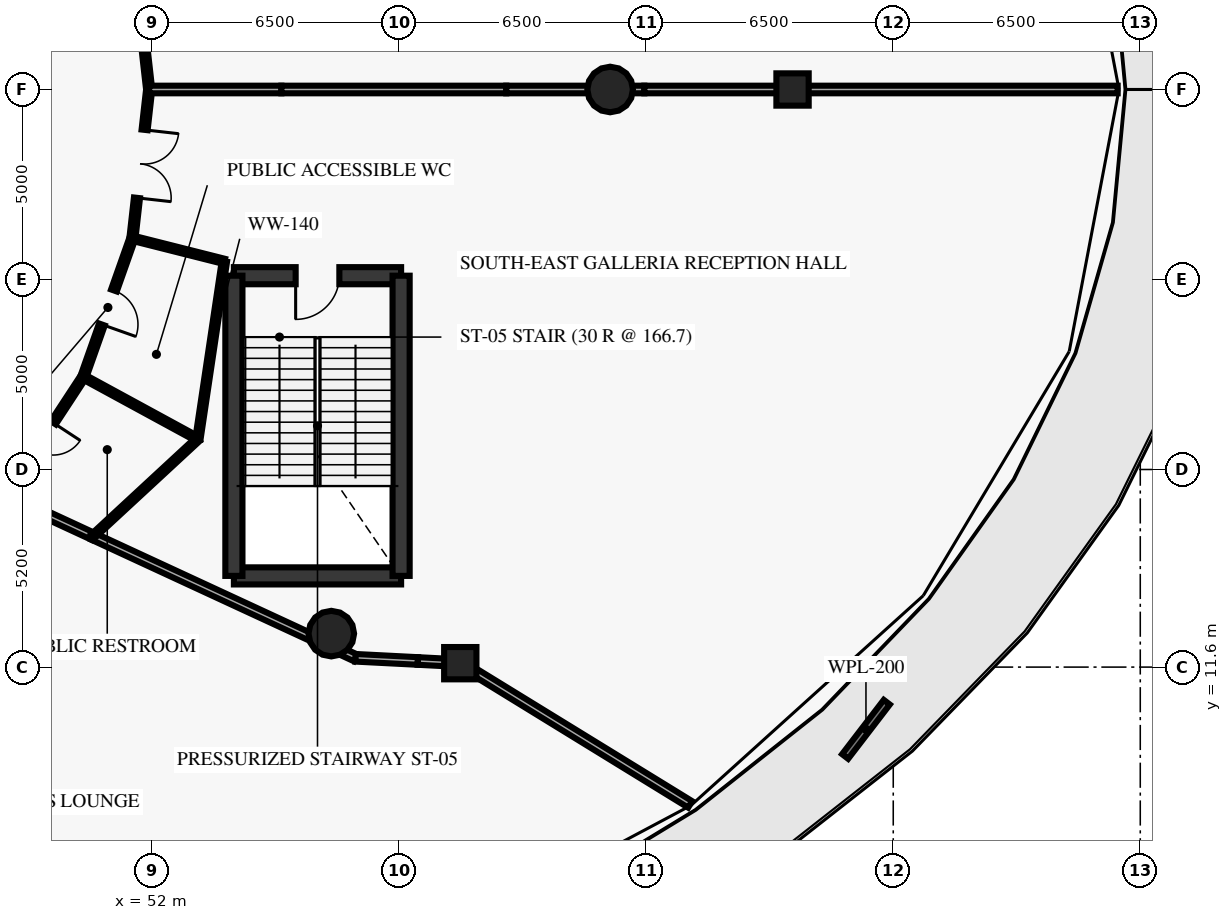
"""IFC4 building model, lengths in metres.
Left out: names, types, materials, properties, quantities, classifications, styles, units other than length and angle.
Written with IfcOpenShell. Run it as: python <this file> out.ifc"""

import sys

from ifc_helpers import new_model, si_unit, direction, frame, frame_2d, origin, origin_2d, place, context, subcontext, project, spatial, rectangle, circle, extrude, element, fill, save


model = new_model("IFC4")
c1 = context("Model", 3, precision=1e-05, world=origin(), true_north=direction((0.0, 1.0)))
c2 = subcontext(c1, "Body", "Model", "MODEL_VIEW")
j1 = project(units=[si_unit("LENGTHUNIT", "METRE"), si_unit("PLANEANGLEUNIT", "RADIAN")], contexts=[c1])
p1 = place(None, origin())
s1 = spatial("IfcSite", under=j1, at=p1, CompositionType="ELEMENT")
p2 = place(p1, origin())
s2 = spatial("IfcBuilding", under=s1, at=p2, CompositionType="ELEMENT")
p3 = place(p2, frame((0.0, 0.0, 6.0)))
s3 = spatial("IfcBuildingStorey", under=s2, at=p3, CompositionType="ELEMENT", Elevation=6.0)
for number, where, z_axis, x_axis in (
    (1, (64.05, 26.8, 0.0), (0.0, 0.0, 1.0), (1.0, 0.0, 0.0)),
    (2, (56.713, 12.481, 0.0), (0.0, 0.0, 1.0), (1.0, 0.0, 0.0)),
):
    element("IfcColumn", number, at=place(p3, frame(where, z_axis=z_axis, x_axis=x_axis)), inside=s3, PredefinedType="COLUMN", context=c2, shape_type="SweptSolid", body=[
        extrude(circle(Radius=0.6, at=origin_2d()), origin(), (0.0, 0.0, 1.0), 4.7),
    ])
for number, where, z_axis, x_axis in (
    (3, (68.85, 26.8, 0.0), (0.0, 0.0, 1.0), (1.0, 0.0, 0.0)),
    (4, (60.107, 11.703, 0.0), (0.0, 0.0, 1.0), (1.0, 0.0, 0.0)),
):
    element("IfcColumn", number, at=place(p3, frame(where, z_axis=z_axis, x_axis=x_axis)), inside=s3, PredefinedType="COLUMN", context=c2, shape_type="SweptSolid", body=[
        extrude(rectangle(XDim=0.85, YDim=0.85, at=origin_2d()), origin(), (0.0, 0.0, 1.0), 4.7),
    ])
p4 = place(p3, frame((71.33, 10.676, 0.0), z_axis=(0.0, 0.0, 1.0), x_axis=(-0.608923978219, -0.793228585434, 0.0)))
e5 = element("IfcWall", 5, at=p4, inside=s3, PredefinedType="ELEMENTEDWALL", context=c2, shape_type="SweptSolid", body=[
    extrude(rectangle(XDim=1.8, YDim=0.2, at=frame_2d((0.9, 0.0))), origin(), (0.0, 0.0, 1.0), 0.65),
])
p5 = place(p3, frame((54.15, 14.0, 0.0), z_axis=(0.0, 0.0, 1.0), x_axis=(1.0, 0.0, 0.0)))
e6 = element("IfcWall", 6, at=p5, inside=s3, PredefinedType="SHEAR", context=c2, shape_type="SweptSolid", body=[
    extrude(rectangle(XDim=4.4, YDim=0.45, at=frame_2d((2.2, 0.0))), origin(), (0.0, 0.0, 1.0), 4.7),
])
p6 = place(p3, frame((58.55, 21.9, 0.0), z_axis=(0.0, 0.0, 1.0), x_axis=(-1.0, 0.0, 0.0)))
e7 = element("IfcWall", 7, at=p6, inside=s3, PredefinedType="SHEAR", context=c2, shape_type="SweptSolid", body=[
    extrude(rectangle(XDim=4.4, YDim=0.45, at=frame_2d((2.2, 0.0))), origin(), (0.0, 0.0, 1.0), 4.7),
])
p7 = place(p6, frame((1.625, 0.0, 0.0)))
e8 = element("IfcOpeningElement", 8, at=p7, cuts=e7, PredefinedType="OPENING", context=c2, shape_type="SweptSolid", body=[
    extrude(rectangle(XDim=1.15, YDim=2.15, at=frame_2d((0.575, 1.075))), frame((0.0, 0.235, 0.0), z_axis=(0.0, -1.0, 0.0), x_axis=(1.0, 0.0, 0.0)), (0.0, 0.0, 1.0), 0.47),
])
for number, where, z_axis, x_axis in (
    (9, (54.15, 14.0, 0.0), (0.0, 0.0, 1.0), (0.0, 1.0, 0.0)),
    (10, (58.55, 14.0, 0.0), (0.0, 0.0, 1.0), (0.0, 1.0, 0.0)),
):
    element("IfcWall", number, at=place(p3, frame(where, z_axis=z_axis, x_axis=x_axis)), inside=s3, PredefinedType="SHEAR", context=c2, shape_type="SweptSolid", body=[
        extrude(rectangle(XDim=7.9, YDim=0.45, at=frame_2d((3.95, 0.0))), origin(), (0.0, 0.0, 1.0), 4.7),
    ])
p8 = place(p3, frame((51.92, 26.8, 0.0), z_axis=(0.0, 0.0, 1.0), x_axis=(-0.111731247657, 0.993738460711, 0.0)))
e11 = element("IfcWall", 11, at=p8, inside=s3, PredefinedType="PARTITIONING", context=c2, shape_type="SweptSolid", body=[
    extrude(rectangle(XDim=3.938, YDim=0.16, at=frame_2d((1.969, 0.0))), origin(), (0.0, 0.0, 1.0), 4.7),
])
p9 = place(p3, frame((50.189, 19.24, 0.0), z_axis=(0.0, 0.0, 1.0), x_axis=(-0.548318837904, -0.836269365694, 0.0)))
e12 = element("IfcWall", 12, at=p9, inside=s3, PredefinedType="PARTITIONING", context=c2, shape_type="SweptSolid", body=[
    extrude(rectangle(XDim=3.744, YDim=0.16, at=frame_2d((1.872, 0.0))), origin(), (0.0, 0.0, 1.0), 4.7),
])
p10 = place(p9, frame((1.447, 0.0, 0.0)))
e13 = element("IfcOpeningElement", 13, at=p10, cuts=e12, PredefinedType="OPENING", context=c2, shape_type="SweptSolid", body=[
    extrude(rectangle(XDim=0.85, YDim=2.1, at=frame_2d((0.425, 1.05))), frame((0.0, 0.09, 0.0), z_axis=(0.0, -1.0, 0.0), x_axis=(1.0, 0.0, 0.0)), (0.0, 0.0, 1.0), 0.18),
])
p11 = place(p3, frame((51.48, 22.887, 0.0), z_axis=(0.0, 0.0, 1.0), x_axis=(-0.333704620558, -0.942677689467, 0.0)))
e14 = element("IfcWall", 14, at=p11, inside=s3, PredefinedType="PARTITIONING", context=c2, shape_type="SweptSolid", body=[
    extrude(rectangle(XDim=3.869, YDim=0.16, at=frame_2d((1.934, 0.0))), origin(), (0.0, 0.0, 1.0), 4.7),
])
p12 = place(p11, frame((1.459, 0.0, 0.0)))
e15 = element("IfcOpeningElement", 15, at=p12, cuts=e14, PredefinedType="OPENING", context=c2, shape_type="SweptSolid", body=[
    extrude(rectangle(XDim=0.95, YDim=2.1, at=frame_2d((0.475, 1.05))), frame((0.0, 0.09, 0.0), z_axis=(0.0, -1.0, 0.0), x_axis=(1.0, 0.0, 0.0)), (0.0, 0.0, 1.0), 0.18),
])
p13 = place(p3, frame((51.92, 26.8, 0.0), z_axis=(0.0, 0.0, 1.0), x_axis=(-0.111724363671, -0.99373923469, 0.0)))
e16 = element("IfcWall", 16, at=p13, inside=s3, PredefinedType="PARTITIONING", context=c2, shape_type="SweptSolid", body=[
    extrude(rectangle(XDim=3.938, YDim=0.16, at=frame_2d((1.969, 0.0))), origin(), (0.0, 0.0, 1.0), 4.7),
])
p14 = place(p13, frame((1.069, 0.0, 0.0)))
e17 = element("IfcOpeningElement", 17, at=p14, cuts=e16, PredefinedType="OPENING", context=c2, shape_type="SweptSolid", body=[
    extrude(rectangle(XDim=1.8, YDim=2.3, at=frame_2d((0.9, 1.15))), frame((0.0, 0.09, 0.0), z_axis=(0.0, -1.0, 0.0), x_axis=(1.0, 0.0, 0.0)), (0.0, 0.0, 1.0), 0.18),
])
p15 = place(p3, frame((51.92, 26.8, 0.0), z_axis=(0.0, 0.0, 1.0), x_axis=(1.0, 0.0, 0.0)))
e18 = element("IfcWall", 18, at=p15, inside=s3, PredefinedType="PARTITIONING", context=c2, shape_type="SweptSolid", body=[
    extrude(rectangle(XDim=3.48, YDim=0.2, at=frame_2d((1.74, 0.0))), origin(), (0.0, 0.0, 1.0), 4.7),
])
p16 = place(p3, frame((55.4, 26.8, 0.0), z_axis=(0.0, 0.0, 1.0), x_axis=(1.0, 0.0, 0.0)))
e19 = element("IfcWall", 19, at=p16, inside=s3, PredefinedType="PARTITIONING", context=c2, shape_type="SweptSolid", body=[
    extrude(rectangle(XDim=5.917, YDim=0.2, at=frame_2d((2.958, 0.0))), origin(), (0.0, 0.0, 1.0), 4.7),
])
p17 = place(p3, frame((61.317, 26.8, 0.0), z_axis=(0.0, 0.0, 1.0), x_axis=(1.0, 0.0, 0.0)))
e20 = element("IfcWall", 20, at=p17, inside=s3, PredefinedType="PARTITIONING", context=c2, shape_type="SweptSolid", body=[
    extrude(rectangle(XDim=3.633, YDim=0.2, at=frame_2d((1.816, 0.0))), origin(), (0.0, 0.0, 1.0), 3.66),
])
p18 = place(p3, frame((64.95, 26.8, 0.0), z_axis=(0.0, 0.0, 1.0), x_axis=(1.0, 0.0, 0.0)))
e21 = element("IfcWall", 21, at=p18, inside=s3, PredefinedType="PARTITIONING", context=c2, shape_type="SweptSolid", body=[
    extrude(rectangle(XDim=3.9, YDim=0.2, at=frame_2d((1.95, 0.0))), origin(), (0.0, 0.0, 1.0), 4.24),
])
p19 = place(p3, frame((68.85, 26.8, 0.0), z_axis=(0.0, 0.0, 1.0), x_axis=(1.0, 0.0, 0.0)))
e22 = element("IfcWall", 22, at=p19, inside=s3, PredefinedType="PARTITIONING", context=c2, shape_type="SweptSolid", body=[
    extrude(rectangle(XDim=8.555, YDim=0.2, at=frame_2d((4.277, 0.0))), origin(), (0.0, 0.0, 1.0), 4.7),
])
p20 = place(p3, frame((48.136, 16.109, 0.0), z_axis=(0.0, 0.0, 1.0), x_axis=(0.907508335547, -0.420034071133, 0.0)))
e23 = element("IfcWall", 23, at=p20, inside=s3, PredefinedType="PARTITIONING", context=c2, shape_type="SweptSolid", body=[
    extrude(rectangle(XDim=2.538, YDim=0.2, at=frame_2d((1.269, 0.0))), origin(), (0.0, 0.0, 1.0), 4.7),
])
p21 = place(p3, frame((50.439, 15.043, 0.0), z_axis=(0.0, 0.0, 1.0), x_axis=(0.907524397356, -0.419999366908, 0.0)))
e24 = element("IfcWall", 24, at=p21, inside=s3, PredefinedType="PARTITIONING", context=c2, shape_type="SweptSolid", body=[
    extrude(rectangle(XDim=7.614, YDim=0.2, at=frame_2d((3.807, 0.0))), origin(), (0.0, 0.0, 1.0), 4.7),
])
p22 = place(p3, frame((57.349, 11.845, 0.0), z_axis=(0.0, 0.0, 1.0), x_axis=(0.998692725363, -0.051115949639, 0.0)))
e25 = element("IfcWall", 25, at=p22, inside=s3, PredefinedType="PARTITIONING", context=c2, shape_type="SweptSolid", body=[
    extrude(rectangle(XDim=1.643, YDim=0.2, at=frame_2d((0.822, 0.0))), origin(), (0.0, 0.0, 1.0), 4.7),
])
p23 = place(p3, frame((58.99, 11.761, 0.0), z_axis=(0.0, 0.0, 1.0), x_axis=(0.998649603439, -0.051951607785, 0.0)))
e26 = element("IfcWall", 26, at=p23, inside=s3, PredefinedType="PARTITIONING", context=c2, shape_type="SweptSolid", body=[
    extrude(rectangle(XDim=1.118, YDim=0.2, at=frame_2d((0.559, 0.0))), origin(), (0.0, 0.0, 1.0), 4.24),
])
p24 = place(p3, frame((60.107, 11.703, 0.0), z_axis=(0.0, 0.0, 1.0), x_axis=(0.852078396496, -0.523414182293, 0.0)))
e27 = element("IfcWall", 27, at=p24, inside=s3, PredefinedType="PARTITIONING", context=c2, shape_type="SweptSolid", body=[
    extrude(rectangle(XDim=7.099, YDim=0.2, at=frame_2d((3.55, 0.0))), origin(), (0.0, 0.0, 1.0), 4.7),
])
p25 = place(p3, frame((50.189, 19.24, 0.0), z_axis=(0.0, 0.0, 1.0), x_axis=(0.878392721738, -0.477939563541, 0.0)))
e28 = element("IfcWall", 28, at=p25, inside=s3, PredefinedType="PARTITIONING", context=c2, shape_type="SweptSolid", body=[
    extrude(rectangle(XDim=3.431, YDim=0.14, at=frame_2d((1.716, 0.0))), origin(), (0.0, 0.0, 1.0), 4.7),
])
p26 = place(p3, frame((51.48, 22.887, 0.0), z_axis=(0.0, 0.0, 1.0), x_axis=(0.969564374521, -0.244836524357, 0.0)))
e29 = element("IfcWall", 29, at=p26, inside=s3, PredefinedType="PARTITIONING", context=c2, shape_type="SweptSolid", body=[
    extrude(rectangle(XDim=2.496, YDim=0.14, at=frame_2d((1.248, 0.0))), origin(), (0.0, 0.0, 1.0), 4.7),
])
p27 = place(p3, frame((50.439, 15.043, 0.0), z_axis=(0.0, 0.0, 1.0), x_axis=(0.734032370371, 0.679114481695, 0.0)))
e30 = element("IfcWall", 30, at=p27, inside=s3, PredefinedType="PARTITIONING", context=c2, shape_type="SweptSolid", body=[
    extrude(rectangle(XDim=3.765, YDim=0.14, at=frame_2d((1.883, 0.0))), origin(), (0.0, 0.0, 1.0), 4.7),
])
p28 = place(p3, frame((53.203, 17.6, 0.0), z_axis=(0.0, 0.0, 1.0), x_axis=(0.147441370436, 0.989070797407, 0.0)))
e31 = element("IfcWall", 31, at=p28, inside=s3, PredefinedType="PARTITIONING", context=c2, shape_type="SweptSolid", body=[
    extrude(rectangle(XDim=4.728, YDim=0.14, at=frame_2d((2.364, 0.0))), origin(), (0.0, 0.0, 1.0), 4.7),
])
p29 = place(p7, origin())
e32 = element("IfcDoor", 32, at=p29, inside=s3, OperationType="SINGLE_SWING_RIGHT", PredefinedType="DOOR", context=c2, shape_type="SweptSolid", body=[
    extrude(rectangle(XDim=1.15, YDim=2.15, at=frame_2d((0.575, 1.075))), frame((0.0, 0.025, 0.0), z_axis=(0.0, -1.0, 0.0), x_axis=(1.0, 0.0, 0.0)), (0.0, 0.0, 1.0), 0.05),
])
fill(e8, e32)
p30 = place(p10, origin())
e33 = element("IfcDoor", 33, at=p30, inside=s3, OperationType="SINGLE_SWING_LEFT", PredefinedType="DOOR", context=c2, shape_type="SweptSolid", body=[
    extrude(rectangle(XDim=0.85, YDim=2.1, at=frame_2d((0.425, 1.05))), frame((0.0, 0.025, 0.0), z_axis=(0.0, -1.0, 0.0), x_axis=(1.0, 0.0, 0.0)), (0.0, 0.0, 1.0), 0.05),
])
fill(e13, e33)
p31 = place(p12, origin())
e34 = element("IfcDoor", 34, at=p31, inside=s3, OperationType="SINGLE_SWING_RIGHT", PredefinedType="DOOR", context=c2, shape_type="SweptSolid", body=[
    extrude(rectangle(XDim=0.95, YDim=2.1, at=frame_2d((0.475, 1.05))), frame((0.0, 0.025, 0.0), z_axis=(0.0, -1.0, 0.0), x_axis=(1.0, 0.0, 0.0)), (0.0, 0.0, 1.0), 0.05),
])
fill(e15, e34)
p32 = place(p14, origin())
e35 = element("IfcDoor", 35, at=p32, inside=s3, OperationType="DOUBLE_DOOR_SINGLE_SWING", PredefinedType="DOOR", context=c2, shape_type="SweptSolid", body=[
    extrude(rectangle(XDim=1.8, YDim=2.3, at=frame_2d((0.9, 1.15))), frame((0.0, 0.025, 0.0), z_axis=(0.0, -1.0, 0.0), x_axis=(1.0, 0.0, 0.0)), (0.0, 0.0, 1.0), 0.05),
])
fill(e17, e35)
save(model, sys.argv[1])
